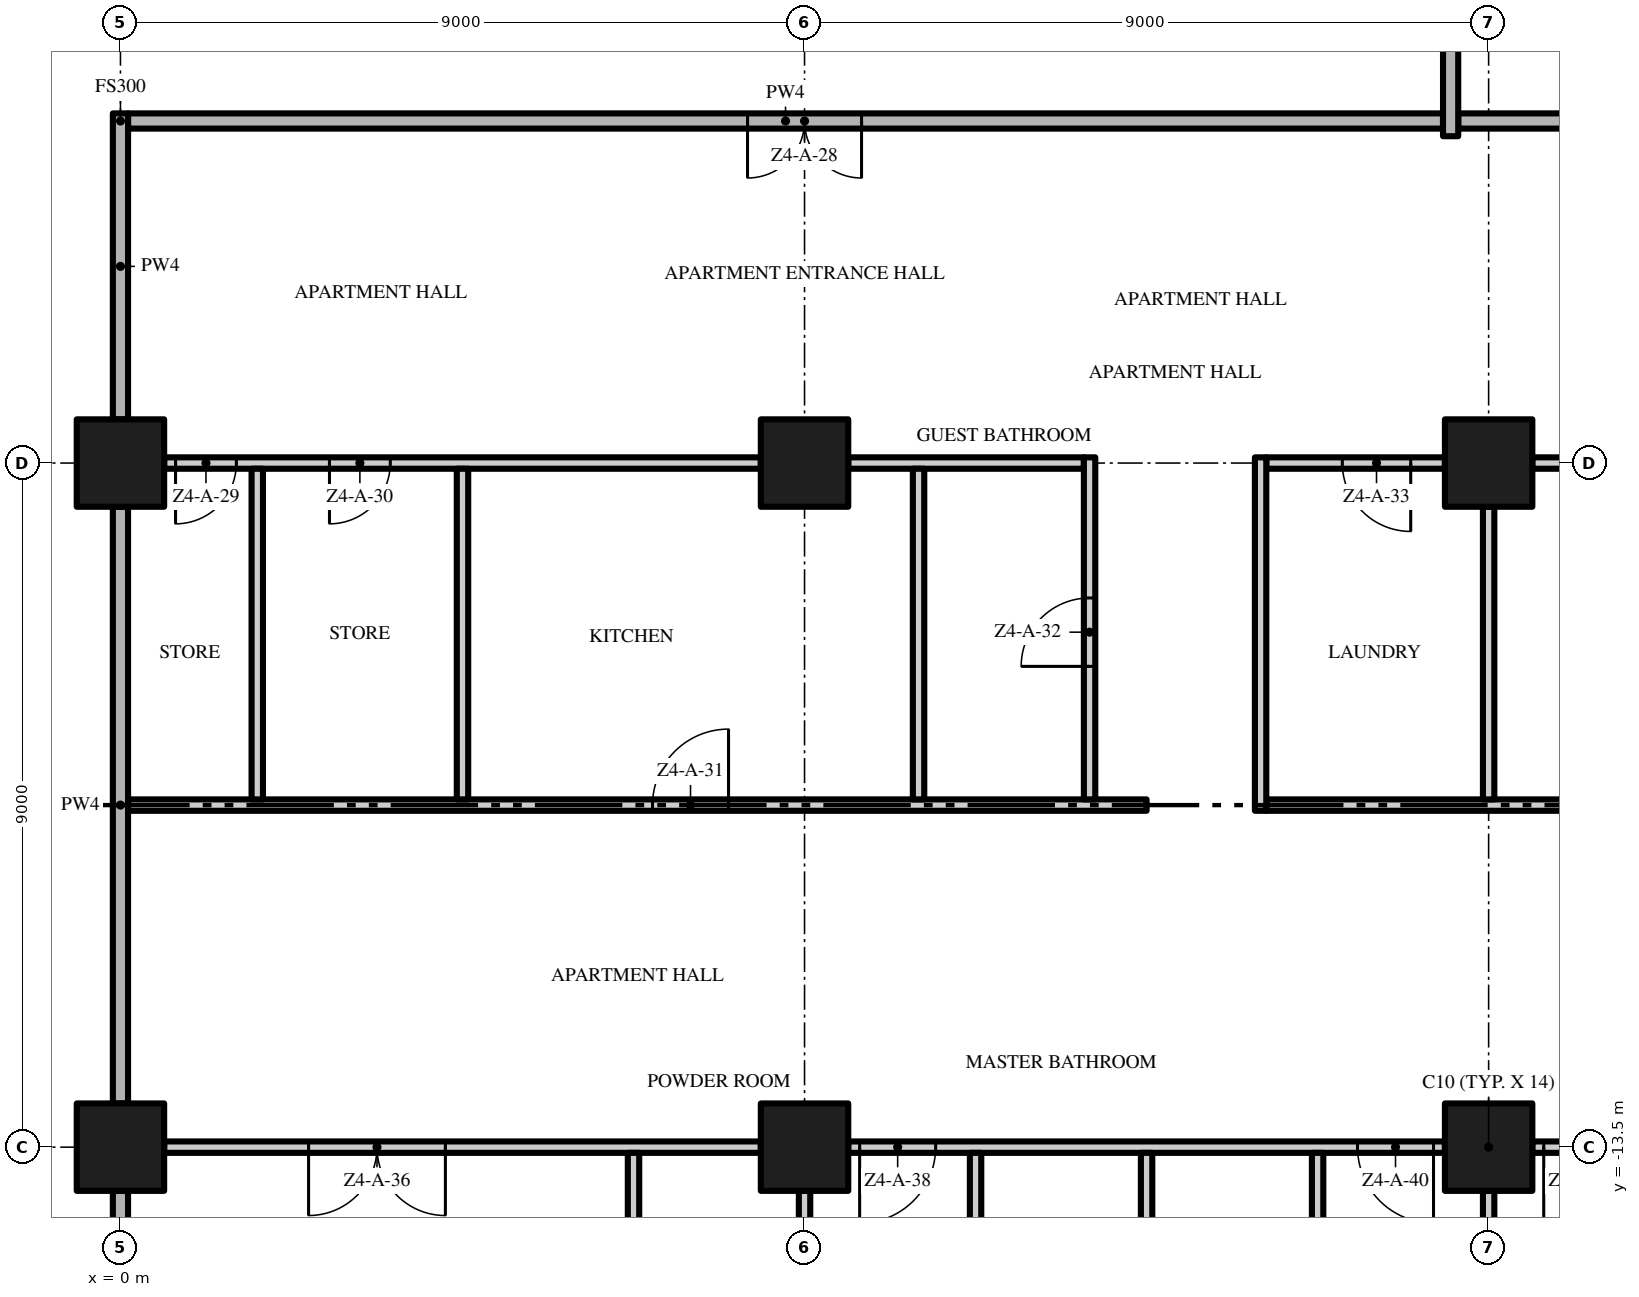
"""IFC4 building model, lengths in metres.
Left out: names, types, materials, properties, quantities, classifications, styles, units other than length and angle.
Written with IfcOpenShell. Run it as: python <this file> out.ifc"""

import sys

from ifc_helpers import new_model, si_unit, direction, frame, frame_2d, origin, origin_2d, place, context, subcontext, project, spatial, rectangle, extrude, element, fill, save


model = new_model("IFC4")
c1 = context("Model", 3, precision=1e-05, world=origin(), true_north=direction((0.0, 1.0)))
c2 = subcontext(c1, "Body", "Model", "MODEL_VIEW")
j1 = project(units=[si_unit("LENGTHUNIT", "METRE"), si_unit("PLANEANGLEUNIT", "RADIAN")], contexts=[c1])
p1 = place(None, origin())
s1 = spatial("IfcSite", under=j1, at=p1, CompositionType="ELEMENT")
p2 = place(p1, origin())
s2 = spatial("IfcBuilding", under=s1, at=p2, CompositionType="ELEMENT")
p3 = place(p2, frame((0.0, 0.0, 188.2)))
s3 = spatial("IfcBuildingStorey", under=s2, at=p3, CompositionType="ELEMENT", Elevation=188.2)
for number, where, z_axis, x_axis in (
    (1, (0.0, -13.5, 0.0), (0.0, 0.0, 1.0), (1.0, 0.0, 0.0)),
    (2, (0.0, -4.5, 0.0), (0.0, 0.0, 1.0), (1.0, 0.0, 0.0)),
    (3, (18.0, -13.5, 0.0), (0.0, 0.0, 1.0), (1.0, 0.0, 0.0)),
    (4, (18.0, -4.5, 0.0), (0.0, 0.0, 1.0), (1.0, 0.0, 0.0)),
    (5, (9.0, -13.5, 0.0), (0.0, 0.0, 1.0), (1.0, 0.0, 0.0)),
    (6, (9.0, -4.5, 0.0), (0.0, 0.0, 1.0), (1.0, 0.0, 0.0)),
):
    element("IfcColumn", number, at=place(p3, frame(where, z_axis=z_axis, x_axis=x_axis)), inside=s3, PredefinedType="COLUMN", context=c2, shape_type="SweptSolid", body=[
        extrude(rectangle(XDim=1.15, YDim=1.15, at=origin_2d()), origin(), (0.0, 0.0, 1.0), 3.5),
    ])
p4 = place(p3, frame((8.425, -13.5, 0.0), z_axis=(0.0, 0.0, 1.0), x_axis=(-1.0, 0.0, 0.0)))
e7 = element("IfcWall", 7, at=p4, inside=s3, PredefinedType="PARTITIONING", context=c2, shape_type="SweptSolid", body=[
    extrude(rectangle(XDim=7.85, YDim=0.15, at=frame_2d((3.925, 0.0))), origin(), (0.0, 0.0, 1.0), 3.5),
])
p5 = place(p4, frame((4.15, 0.0, 0.0)))
e8 = element("IfcOpeningElement", 8, at=p5, cuts=e7, PredefinedType="OPENING", context=c2, shape_type="SweptSolid", body=[
    extrude(rectangle(XDim=1.8, YDim=2.4, at=frame_2d((0.9, 1.2))), frame((0.0, 0.085, 0.0), z_axis=(0.0, -1.0, 0.0), x_axis=(1.0, 0.0, 0.0)), (0.0, 0.0, 1.0), 0.17),
])
p6 = place(p3, frame((17.425, -13.5, 0.0), z_axis=(0.0, 0.0, 1.0), x_axis=(-1.0, 0.0, 0.0)))
e9 = element("IfcWall", 9, at=p6, inside=s3, PredefinedType="PARTITIONING", context=c2, shape_type="SweptSolid", body=[
    extrude(rectangle(XDim=7.85, YDim=0.15, at=frame_2d((3.925, 0.0))), origin(), (0.0, 0.0, 1.0), 3.5),
])
p7 = place(p6, frame((6.7, 0.0, 0.0)))
e10 = element("IfcOpeningElement", 10, at=p7, cuts=e9, PredefinedType="OPENING", context=c2, shape_type="SweptSolid", body=[
    extrude(rectangle(XDim=1.0, YDim=2.4, at=frame_2d((0.5, 1.2))), frame((0.0, 0.085, 0.0), z_axis=(0.0, -1.0, 0.0), x_axis=(1.0, 0.0, 0.0)), (0.0, 0.0, 1.0), 0.17),
])
p8 = place(p6, frame((0.15, 0.0, 0.0)))
e11 = element("IfcOpeningElement", 11, at=p8, cuts=e9, PredefinedType="OPENING", context=c2, shape_type="SweptSolid", body=[
    extrude(rectangle(XDim=1.0, YDim=2.4, at=frame_2d((0.5, 1.2))), frame((0.0, 0.085, 0.0), z_axis=(0.0, -1.0, 0.0), x_axis=(1.0, 0.0, 0.0)), (0.0, 0.0, 1.0), 0.17),
])
p9 = place(p3, frame((25.95, -13.5, 0.0), z_axis=(0.0, 0.0, 1.0), x_axis=(-1.0, 0.0, 0.0)))
e12 = element("IfcWall", 12, at=p9, inside=s3, PredefinedType="PARTITIONING", context=c2, shape_type="SweptSolid", body=[
    extrude(rectangle(XDim=7.375, YDim=0.15, at=frame_2d((3.688, 0.0))), origin(), (0.0, 0.0, 1.0), 3.5),
])
p10 = place(p9, frame((6.225, 0.0, 0.0)))
e13 = element("IfcOpeningElement", 13, at=p10, cuts=e12, PredefinedType="OPENING", context=c2, shape_type="SweptSolid", body=[
    extrude(rectangle(XDim=1.0, YDim=2.4, at=frame_2d((0.5, 1.2))), frame((0.0, 0.085, 0.0), z_axis=(0.0, -1.0, 0.0), x_axis=(1.0, 0.0, 0.0)), (0.0, 0.0, 1.0), 0.17),
])
p11 = place(p9, frame((0.45, 0.0, 0.0)))
e14 = element("IfcOpeningElement", 14, at=p11, cuts=e12, PredefinedType="OPENING", context=c2, shape_type="SweptSolid", body=[
    extrude(rectangle(XDim=1.5, YDim=2.4, at=frame_2d((0.75, 1.2))), frame((0.0, 0.085, 0.0), z_axis=(0.0, -1.0, 0.0), x_axis=(1.0, 0.0, 0.0)), (0.0, 0.0, 1.0), 0.17),
])
p12 = place(p3, frame((0.1, -9.0, 0.0), z_axis=(0.0, 0.0, 1.0), x_axis=(1.0, 0.0, 0.0)))
e15 = element("IfcWall", 15, at=p12, inside=s3, PredefinedType="PARTITIONING", context=c2, shape_type="SweptSolid", body=[
    extrude(rectangle(XDim=13.4, YDim=0.15, at=frame_2d((6.7, 0.0))), origin(), (0.0, 0.0, 1.0), 3.5),
])
p13 = place(p12, frame((6.9, 0.0, 0.0)))
e16 = element("IfcOpeningElement", 16, at=p13, cuts=e15, PredefinedType="OPENING", context=c2, shape_type="SweptSolid", body=[
    extrude(rectangle(XDim=1.0, YDim=2.4, at=frame_2d((0.5, 1.2))), frame((0.0, 0.085, 0.0), z_axis=(0.0, -1.0, 0.0), x_axis=(1.0, 0.0, 0.0)), (0.0, 0.0, 1.0), 0.17),
])
p14 = place(p3, frame((15.075, -9.0, 0.0), z_axis=(0.0, 0.0, 1.0), x_axis=(1.0, 0.0, 0.0)))
e17 = element("IfcWall", 17, at=p14, inside=s3, PredefinedType="PARTITIONING", context=c2, shape_type="SweptSolid", body=[
    extrude(rectangle(XDim=11.625, YDim=0.15, at=frame_2d((5.812, 0.0))), origin(), (0.0, 0.0, 1.0), 3.5),
])
p15 = place(p3, frame((8.425, -4.5, 0.0), z_axis=(0.0, 0.0, 1.0), x_axis=(-1.0, 0.0, 0.0)))
e18 = element("IfcWall", 18, at=p15, inside=s3, PredefinedType="PARTITIONING", context=c2, shape_type="SweptSolid", body=[
    extrude(rectangle(XDim=7.85, YDim=0.15, at=frame_2d((3.925, 0.0))), origin(), (0.0, 0.0, 1.0), 3.5),
])
p16 = place(p15, frame((6.9, 0.0, 0.0)))
e19 = element("IfcOpeningElement", 19, at=p16, cuts=e18, PredefinedType="OPENING", context=c2, shape_type="SweptSolid", body=[
    extrude(rectangle(XDim=0.8, YDim=2.0, at=frame_2d((0.4, 1.0))), frame((0.0, 0.085, 0.0), z_axis=(0.0, -1.0, 0.0), x_axis=(1.0, 0.0, 0.0)), (0.0, 0.0, 1.0), 0.17),
])
p17 = place(p15, frame((4.875, 0.0, 0.0)))
e20 = element("IfcOpeningElement", 20, at=p17, cuts=e18, PredefinedType="OPENING", context=c2, shape_type="SweptSolid", body=[
    extrude(rectangle(XDim=0.8, YDim=2.0, at=frame_2d((0.4, 1.0))), frame((0.0, 0.085, 0.0), z_axis=(0.0, -1.0, 0.0), x_axis=(1.0, 0.0, 0.0)), (0.0, 0.0, 1.0), 0.17),
])
p18 = place(p3, frame((9.575, -4.5, 0.0), z_axis=(0.0, 0.0, 1.0), x_axis=(1.0, 0.0, 0.0)))
e21 = element("IfcWall", 21, at=p18, inside=s3, PredefinedType="PARTITIONING", context=c2, shape_type="SweptSolid", body=[
    extrude(rectangle(XDim=3.1, YDim=0.15, at=frame_2d((1.55, 0.0))), origin(), (0.0, 0.0, 1.0), 3.5),
])
p19 = place(p3, frame((17.425, -4.5, 0.0), z_axis=(0.0, 0.0, 1.0), x_axis=(-1.0, 0.0, 0.0)))
e22 = element("IfcWall", 22, at=p19, inside=s3, PredefinedType="PARTITIONING", context=c2, shape_type="SweptSolid", body=[
    extrude(rectangle(XDim=2.35, YDim=0.15, at=frame_2d((1.175, 0.0))), origin(), (0.0, 0.0, 1.0), 3.5),
])
p20 = place(p19, frame((0.45, 0.0, 0.0)))
e23 = element("IfcOpeningElement", 23, at=p20, cuts=e22, PredefinedType="OPENING", context=c2, shape_type="SweptSolid", body=[
    extrude(rectangle(XDim=0.9, YDim=2.1, at=frame_2d((0.45, 1.05))), frame((0.0, 0.085, 0.0), z_axis=(0.0, -1.0, 0.0), x_axis=(1.0, 0.0, 0.0)), (0.0, 0.0, 1.0), 0.17),
])
p21 = place(p3, frame((25.95, -4.5, 0.0), z_axis=(0.0, 0.0, 1.0), x_axis=(-1.0, 0.0, 0.0)))
e24 = element("IfcWall", 24, at=p21, inside=s3, PredefinedType="PARTITIONING", context=c2, shape_type="SweptSolid", body=[
    extrude(rectangle(XDim=7.375, YDim=0.15, at=frame_2d((3.688, 0.0))), origin(), (0.0, 0.0, 1.0), 3.5),
])
p22 = place(p21, frame((4.875, 0.0, 0.0)))
e25 = element("IfcOpeningElement", 25, at=p22, cuts=e24, PredefinedType="OPENING", context=c2, shape_type="SweptSolid", body=[
    extrude(rectangle(XDim=0.9, YDim=2.1, at=frame_2d((0.45, 1.05))), frame((0.0, 0.085, 0.0), z_axis=(0.0, -1.0, 0.0), x_axis=(1.0, 0.0, 0.0)), (0.0, 0.0, 1.0), 0.17),
])
p23 = place(p3, frame((17.4, 0.0, 0.0), z_axis=(0.0, 0.0, 1.0), x_axis=(-1.0, 0.0, 0.0)))
e26 = element("IfcWall", 26, at=p23, inside=s3, PredefinedType="PARTITIONING", context=c2, shape_type="SweptSolid", body=[
    extrude(rectangle(XDim=17.3, YDim=0.2, at=frame_2d((8.65, 0.0))), origin(), (0.0, 0.0, 1.0), 3.5),
])
p24 = place(p23, frame((7.65, 0.0, 0.0)))
e27 = element("IfcOpeningElement", 27, at=p24, cuts=e26, PredefinedType="OPENING", context=c2, shape_type="SweptSolid", body=[
    extrude(rectangle(XDim=1.5, YDim=2.4, at=frame_2d((0.75, 1.2))), frame((0.0, 0.11, 0.0), z_axis=(0.0, -1.0, 0.0), x_axis=(1.0, 0.0, 0.0)), (0.0, 0.0, 1.0), 0.22),
])
p25 = place(p3, frame((17.6, 0.0, 0.0), z_axis=(0.0, 0.0, 1.0), x_axis=(1.0, 0.0, 0.0)))
e28 = element("IfcWall", 28, at=p25, inside=s3, PredefinedType="PARTITIONING", context=c2, shape_type="SweptSolid", body=[
    extrude(rectangle(XDim=9.1, YDim=0.2, at=frame_2d((4.55, 0.0))), origin(), (0.0, 0.0, 1.0), 3.5),
])
p26 = place(p3, frame((0.0, -21.45, 0.0), z_axis=(0.0, 0.0, 1.0), x_axis=(0.0, 1.0, 0.0)))
e29 = element("IfcWall", 29, at=p26, inside=s3, PredefinedType="PARTITIONING", context=c2, shape_type="SweptSolid", body=[
    extrude(rectangle(XDim=7.375, YDim=0.2, at=frame_2d((3.688, 0.0))), origin(), (0.0, 0.0, 1.0), 3.5),
])
p27 = place(p3, frame((0.0, -12.925, 0.0), z_axis=(0.0, 0.0, 1.0), x_axis=(0.0, 1.0, 0.0)))
e30 = element("IfcWall", 30, at=p27, inside=s3, PredefinedType="PARTITIONING", context=c2, shape_type="SweptSolid", body=[
    extrude(rectangle(XDim=7.85, YDim=0.2, at=frame_2d((3.925, 0.0))), origin(), (0.0, 0.0, 1.0), 3.5),
])
p28 = place(p3, frame((0.0, -3.925, 0.0), z_axis=(0.0, 0.0, 1.0), x_axis=(0.0, 1.0, 0.0)))
e31 = element("IfcWall", 31, at=p28, inside=s3, PredefinedType="PARTITIONING", context=c2, shape_type="SweptSolid", body=[
    extrude(rectangle(XDim=4.025, YDim=0.2, at=frame_2d((2.013, 0.0))), origin(), (0.0, 0.0, 1.0), 3.5),
])
for number, where, z_axis, x_axis in (
    (32, (1.8, -8.925, 0.0), (0.0, 0.0, 1.0), (0.0, 1.0, 0.0)),
    (33, (4.5, -8.925, 0.0), (0.0, 0.0, 1.0), (0.0, 1.0, 0.0)),
):
    element("IfcWall", number, at=place(p3, frame(where, z_axis=z_axis, x_axis=x_axis)), inside=s3, PredefinedType="PARTITIONING", context=c2, shape_type="SweptSolid", body=[
        extrude(rectangle(XDim=4.35, YDim=0.15, at=frame_2d((2.175, 0.0))), origin(), (0.0, 0.0, 1.0), 3.5),
    ])
p29 = place(p3, frame((6.75, -16.575, 0.0), z_axis=(0.0, 0.0, 1.0), x_axis=(0.0, 1.0, 0.0)))
e34 = element("IfcWall", 34, at=p29, inside=s3, PredefinedType="PARTITIONING", context=c2, shape_type="SweptSolid", body=[
    extrude(rectangle(XDim=3.0, YDim=0.15, at=frame_2d((1.5, 0.0))), origin(), (0.0, 0.0, 1.0), 3.5),
])
p30 = place(p3, frame((9.0, -21.45, 0.0), z_axis=(0.0, 0.0, 1.0), x_axis=(0.0, 1.0, 0.0)))
e35 = element("IfcWall", 35, at=p30, inside=s3, PredefinedType="PARTITIONING", context=c2, shape_type="SweptSolid", body=[
    extrude(rectangle(XDim=7.375, YDim=0.15, at=frame_2d((3.688, 0.0))), origin(), (0.0, 0.0, 1.0), 3.5),
])
p31 = place(p3, frame((10.5, -8.925, 0.0), z_axis=(0.0, 0.0, 1.0), x_axis=(0.0, 1.0, 0.0)))
e36 = element("IfcWall", 36, at=p31, inside=s3, PredefinedType="PARTITIONING", context=c2, shape_type="SweptSolid", body=[
    extrude(rectangle(XDim=4.35, YDim=0.15, at=frame_2d((2.175, 0.0))), origin(), (0.0, 0.0, 1.0), 3.5),
])
p32 = place(p3, frame((11.25, -16.575, 0.0), z_axis=(0.0, 0.0, 1.0), x_axis=(0.0, 1.0, 0.0)))
e37 = element("IfcWall", 37, at=p32, inside=s3, PredefinedType="PARTITIONING", context=c2, shape_type="SweptSolid", body=[
    extrude(rectangle(XDim=3.0, YDim=0.15, at=frame_2d((1.5, 0.0))), origin(), (0.0, 0.0, 1.0), 3.5),
])
p33 = place(p3, frame((12.75, -8.925, 0.0), z_axis=(0.0, 0.0, 1.0), x_axis=(0.0, 1.0, 0.0)))
e38 = element("IfcWall", 38, at=p33, inside=s3, PredefinedType="PARTITIONING", context=c2, shape_type="SweptSolid", body=[
    extrude(rectangle(XDim=4.5, YDim=0.15, at=frame_2d((2.25, 0.0))), origin(), (0.0, 0.0, 1.0), 3.5),
])
p34 = place(p33, frame((1.75, 0.0, 0.0)))
e39 = element("IfcOpeningElement", 39, at=p34, cuts=e38, PredefinedType="OPENING", context=c2, shape_type="SweptSolid", body=[
    extrude(rectangle(XDim=0.9, YDim=2.1, at=frame_2d((0.45, 1.05))), frame((0.0, 0.085, 0.0), z_axis=(0.0, -1.0, 0.0), x_axis=(1.0, 0.0, 0.0)), (0.0, 0.0, 1.0), 0.17),
])
p35 = place(p3, frame((13.5, -22.2, 0.0), z_axis=(0.0, 0.0, 1.0), x_axis=(0.0, 1.0, 0.0)))
e40 = element("IfcWall", 40, at=p35, inside=s3, PredefinedType="PARTITIONING", context=c2, shape_type="SweptSolid", body=[
    extrude(rectangle(XDim=8.625, YDim=0.15, at=frame_2d((4.312, 0.0))), origin(), (0.0, 0.0, 1.0), 3.5),
])
p36 = place(p3, frame((15.0, -9.075, 0.0), z_axis=(0.0, 0.0, 1.0), x_axis=(0.0, 1.0, 0.0)))
e41 = element("IfcWall", 41, at=p36, inside=s3, PredefinedType="PARTITIONING", context=c2, shape_type="SweptSolid", body=[
    extrude(rectangle(XDim=4.65, YDim=0.15, at=frame_2d((2.325, 0.0))), origin(), (0.0, 0.0, 1.0), 3.5),
])
p37 = place(p3, frame((15.75, -16.575, 0.0), z_axis=(0.0, 0.0, 1.0), x_axis=(0.0, 1.0, 0.0)))
e42 = element("IfcWall", 42, at=p37, inside=s3, PredefinedType="PARTITIONING", context=c2, shape_type="SweptSolid", body=[
    extrude(rectangle(XDim=3.0, YDim=0.15, at=frame_2d((1.5, 0.0))), origin(), (0.0, 0.0, 1.0), 3.5),
])
p38 = place(p3, frame((17.5, -0.2, 0.0), z_axis=(0.0, 0.0, 1.0), x_axis=(0.0, 1.0, 0.0)))
e43 = element("IfcWall", 43, at=p38, inside=s3, PredefinedType="PARTITIONING", context=c2, shape_type="SweptSolid", body=[
    extrude(rectangle(XDim=4.125, YDim=0.2, at=frame_2d((2.062, 0.0))), origin(), (0.0, 0.0, 1.0), 3.5),
])
p39 = place(p3, frame((18.0, -21.45, 0.0), z_axis=(0.0, 0.0, 1.0), x_axis=(0.0, 1.0, 0.0)))
e44 = element("IfcWall", 44, at=p39, inside=s3, PredefinedType="PARTITIONING", context=c2, shape_type="SweptSolid", body=[
    extrude(rectangle(XDim=7.375, YDim=0.15, at=frame_2d((3.688, 0.0))), origin(), (0.0, 0.0, 1.0), 3.5),
])
p40 = place(p3, frame((18.0, -8.925, 0.0), z_axis=(0.0, 0.0, 1.0), x_axis=(0.0, 1.0, 0.0)))
e45 = element("IfcWall", 45, at=p40, inside=s3, PredefinedType="PARTITIONING", context=c2, shape_type="SweptSolid", body=[
    extrude(rectangle(XDim=3.85, YDim=0.15, at=frame_2d((1.925, 0.0))), origin(), (0.0, 0.0, 1.0), 3.5),
])
p41 = place(p24, origin())
e46 = element("IfcDoor", 46, at=p41, inside=s3, OperationType="DOUBLE_DOOR_SINGLE_SWING", PredefinedType="DOOR", context=c2, shape_type="SweptSolid", body=[
    extrude(rectangle(XDim=1.5, YDim=2.4, at=frame_2d((0.75, 1.2))), frame((0.0, 0.025, 0.0), z_axis=(0.0, -1.0, 0.0), x_axis=(1.0, 0.0, 0.0)), (0.0, 0.0, 1.0), 0.05),
])
fill(e27, e46)
p42 = place(p16, origin())
e47 = element("IfcDoor", 47, at=p42, inside=s3, OperationType="SINGLE_SWING_RIGHT", PredefinedType="DOOR", context=c2, shape_type="SweptSolid", body=[
    extrude(rectangle(XDim=0.8, YDim=2.0, at=frame_2d((0.4, 1.0))), frame((0.0, 0.025, 0.0), z_axis=(0.0, -1.0, 0.0), x_axis=(1.0, 0.0, 0.0)), (0.0, 0.0, 1.0), 0.05),
])
fill(e19, e47)
p43 = place(p17, origin())
e48 = element("IfcDoor", 48, at=p43, inside=s3, OperationType="SINGLE_SWING_RIGHT", PredefinedType="DOOR", context=c2, shape_type="SweptSolid", body=[
    extrude(rectangle(XDim=0.8, YDim=2.0, at=frame_2d((0.4, 1.0))), frame((0.0, 0.025, 0.0), z_axis=(0.0, -1.0, 0.0), x_axis=(1.0, 0.0, 0.0)), (0.0, 0.0, 1.0), 0.05),
])
fill(e20, e48)
p44 = place(p13, origin())
e49 = element("IfcDoor", 49, at=p44, inside=s3, OperationType="SINGLE_SWING_RIGHT", PredefinedType="DOOR", context=c2, shape_type="SweptSolid", body=[
    extrude(rectangle(XDim=1.0, YDim=2.4, at=frame_2d((0.5, 1.2))), frame((0.0, 0.025, 0.0), z_axis=(0.0, -1.0, 0.0), x_axis=(1.0, 0.0, 0.0)), (0.0, 0.0, 1.0), 0.05),
])
fill(e16, e49)
p45 = place(p34, origin())
e50 = element("IfcDoor", 50, at=p45, inside=s3, OperationType="SINGLE_SWING_LEFT", PredefinedType="DOOR", context=c2, shape_type="SweptSolid", body=[
    extrude(rectangle(XDim=0.9, YDim=2.1, at=frame_2d((0.45, 1.05))), frame((0.0, 0.025, 0.0), z_axis=(0.0, -1.0, 0.0), x_axis=(1.0, 0.0, 0.0)), (0.0, 0.0, 1.0), 0.05),
])
fill(e39, e50)
p46 = place(p20, origin())
e51 = element("IfcDoor", 51, at=p46, inside=s3, OperationType="SINGLE_SWING_LEFT", PredefinedType="DOOR", context=c2, shape_type="SweptSolid", body=[
    extrude(rectangle(XDim=0.9, YDim=2.1, at=frame_2d((0.45, 1.05))), frame((0.0, 0.025, 0.0), z_axis=(0.0, -1.0, 0.0), x_axis=(1.0, 0.0, 0.0)), (0.0, 0.0, 1.0), 0.05),
])
fill(e23, e51)
p47 = place(p5, origin())
e52 = element("IfcDoor", 52, at=p47, inside=s3, OperationType="DOUBLE_DOOR_SINGLE_SWING", PredefinedType="DOOR", context=c2, shape_type="SweptSolid", body=[
    extrude(rectangle(XDim=1.8, YDim=2.4, at=frame_2d((0.9, 1.2))), frame((0.0, 0.025, 0.0), z_axis=(0.0, -1.0, 0.0), x_axis=(1.0, 0.0, 0.0)), (0.0, 0.0, 1.0), 0.05),
])
fill(e8, e52)
p48 = place(p7, origin())
e53 = element("IfcDoor", 53, at=p48, inside=s3, OperationType="SINGLE_SWING_RIGHT", PredefinedType="DOOR", context=c2, shape_type="SweptSolid", body=[
    extrude(rectangle(XDim=1.0, YDim=2.4, at=frame_2d((0.5, 1.2))), frame((0.0, 0.025, 0.0), z_axis=(0.0, -1.0, 0.0), x_axis=(1.0, 0.0, 0.0)), (0.0, 0.0, 1.0), 0.05),
])
fill(e10, e53)
p49 = place(p8, origin())
e54 = element("IfcDoor", 54, at=p49, inside=s3, OperationType="SINGLE_SWING_LEFT", PredefinedType="DOOR", context=c2, shape_type="SweptSolid", body=[
    extrude(rectangle(XDim=1.0, YDim=2.4, at=frame_2d((0.5, 1.2))), frame((0.0, 0.025, 0.0), z_axis=(0.0, -1.0, 0.0), x_axis=(1.0, 0.0, 0.0)), (0.0, 0.0, 1.0), 0.05),
])
fill(e11, e54)
p50 = place(p10, origin())
e55 = element("IfcDoor", 55, at=p50, inside=s3, OperationType="SINGLE_SWING_RIGHT", PredefinedType="DOOR", context=c2, shape_type="SweptSolid", body=[
    extrude(rectangle(XDim=1.0, YDim=2.4, at=frame_2d((0.5, 1.2))), frame((0.0, 0.025, 0.0), z_axis=(0.0, -1.0, 0.0), x_axis=(1.0, 0.0, 0.0)), (0.0, 0.0, 1.0), 0.05),
])
fill(e13, e55)
save(model, sys.argv[1])
